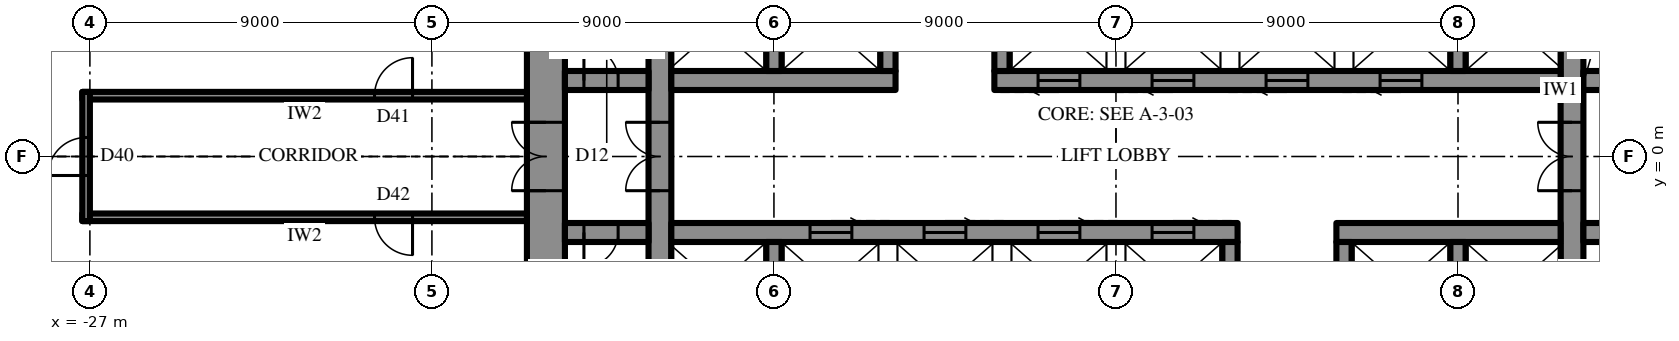
"""IFC4 building model, lengths in metres.
Left out: names, types, materials, properties, quantities, classifications, styles, units other than length and angle.
Written with IfcOpenShell. Run it as: python <this file> out.ifc"""

import sys

from ifc_helpers import new_model, si_unit, direction, frame, frame_2d, origin, place, context, subcontext, project, spatial, rectangle, extrude, element, fill, save


model = new_model("IFC4")
c1 = context("Model", 3, precision=1e-05, world=origin(), true_north=direction((0.0, 1.0)))
c2 = subcontext(c1, "Body", "Model", "MODEL_VIEW")
j1 = project(units=[si_unit("LENGTHUNIT", "METRE"), si_unit("PLANEANGLEUNIT", "RADIAN")], contexts=[c1])
p1 = place(None, origin())
s1 = spatial("IfcSite", under=j1, at=p1, CompositionType="ELEMENT")
p2 = place(p1, origin())
s2 = spatial("IfcBuilding", under=s1, at=p2, CompositionType="ELEMENT")
p3 = place(p2, frame((0.0, 0.0, 261.7)))
s3 = spatial("IfcBuildingStorey", under=s2, at=p3, CompositionType="ELEMENT", Elevation=261.7)
p4 = place(p3, frame((-15.0, 10.7, 0.0), z_axis=(0.0, 0.0, 1.0), x_axis=(0.0, -1.0, 0.0)))
e1 = element("IfcWall", 1, at=p4, inside=s3, PredefinedType="SHEAR", context=c2, shape_type="SweptSolid", body=[
    extrude(rectangle(XDim=21.4, YDim=1.0, at=frame_2d((10.7, 0.0))), origin(), (0.0, 0.0, 1.0), 4.2),
])
p5 = place(p4, frame((9.8, 0.0, 0.0)))
e2 = element("IfcOpeningElement", 2, at=p5, cuts=e1, PredefinedType="OPENING", context=c2, shape_type="SweptSolid", body=[
    extrude(rectangle(XDim=1.8, YDim=2.4, at=frame_2d((0.9, 1.2))), frame((0.0, 0.51, 0.0), z_axis=(0.0, -1.0, 0.0), x_axis=(1.0, 0.0, 0.0)), (0.0, 0.0, 1.0), 1.02),
])
p6 = place(p3, frame((12.0, -10.7, 0.0), z_axis=(0.0, 0.0, 1.0), x_axis=(0.0, 1.0, 0.0)))
e3 = element("IfcWall", 3, at=p6, inside=s3, PredefinedType="SHEAR", context=c2, shape_type="SweptSolid", body=[
    extrude(rectangle(XDim=21.4, YDim=0.6, at=frame_2d((10.7, 0.0))), origin(), (0.0, 0.0, 1.0), 4.2),
])
p7 = place(p6, frame((9.8, 0.0, 0.0)))
e4 = element("IfcOpeningElement", 4, at=p7, cuts=e3, PredefinedType="OPENING", context=c2, shape_type="SweptSolid", body=[
    extrude(rectangle(XDim=1.8, YDim=2.4, at=frame_2d((0.9, 1.2))), frame((0.0, 0.31, 0.0), z_axis=(0.0, -1.0, 0.0), x_axis=(1.0, 0.0, 0.0)), (0.0, 0.0, 1.0), 0.62),
])
p8 = place(p3, frame((-12.0, -10.7, 0.0), z_axis=(0.0, 0.0, 1.0), x_axis=(0.0, 1.0, 0.0)))
e5 = element("IfcWall", 5, at=p8, inside=s3, PredefinedType="SHEAR", context=c2, shape_type="SweptSolid", body=[
    extrude(rectangle(XDim=21.4, YDim=0.6, at=frame_2d((10.7, 0.0))), origin(), (0.0, 0.0, 1.0), 4.2),
])
p9 = place(p8, frame((9.8, 0.0, 0.0)))
e6 = element("IfcOpeningElement", 6, at=p9, cuts=e5, PredefinedType="OPENING", context=c2, shape_type="SweptSolid", body=[
    extrude(rectangle(XDim=1.8, YDim=2.4, at=frame_2d((0.9, 1.2))), frame((0.0, 0.31, 0.0), z_axis=(0.0, -1.0, 0.0), x_axis=(1.0, 0.0, 0.0)), (0.0, 0.0, 1.0), 0.62),
])
p10 = place(p3, frame((-14.5, 2.0, 0.0), z_axis=(0.0, 0.0, 1.0), x_axis=(1.0, 0.0, 0.0)))
e7 = element("IfcWall", 7, at=p10, inside=s3, PredefinedType="SHEAR", context=c2, shape_type="SweptSolid", body=[
    extrude(rectangle(XDim=2.2, YDim=0.5, at=frame_2d((1.1, 0.0))), origin(), (0.0, 0.0, 1.0), 4.2),
])
p11 = place(p10, frame((0.5, 0.0, 0.0)))
e8 = element("IfcOpeningElement", 8, at=p11, cuts=e7, PredefinedType="OPENING", context=c2, shape_type="SweptSolid", body=[
    extrude(rectangle(XDim=0.9, YDim=2.2, at=frame_2d((0.45, 1.1))), frame((0.0, 0.26, 0.0), z_axis=(0.0, -1.0, 0.0), x_axis=(1.0, 0.0, 0.0)), (0.0, 0.0, 1.0), 0.52),
])
p12 = place(p3, frame((-11.7, 2.0, 0.0), z_axis=(0.0, 0.0, 1.0), x_axis=(1.0, 0.0, 0.0)))
e9 = element("IfcWall", 9, at=p12, inside=s3, PredefinedType="SHEAR", context=c2, shape_type="SweptSolid", body=[
    extrude(rectangle(XDim=5.9, YDim=0.5, at=frame_2d((2.95, 0.0))), origin(), (0.0, 0.0, 1.0), 4.2),
])
p13 = place(p3, frame((-3.2, 2.0, 0.0), z_axis=(0.0, 0.0, 1.0), x_axis=(1.0, 0.0, 0.0)))
e10 = element("IfcWall", 10, at=p13, inside=s3, PredefinedType="SHEAR", context=c2, shape_type="SweptSolid", body=[
    extrude(rectangle(XDim=14.9, YDim=0.5, at=frame_2d((7.45, 0.0))), origin(), (0.0, 0.0, 1.0), 4.2),
])
p14 = place(p13, frame((1.15, 0.0, 0.0)))
e11 = element("IfcOpeningElement", 11, at=p14, cuts=e10, PredefinedType="OPENING", context=c2, shape_type="SweptSolid", body=[
    extrude(rectangle(XDim=1.1, YDim=2.2, at=frame_2d((0.55, 1.1))), frame((0.0, 0.26, 0.0), z_axis=(0.0, -1.0, 0.0), x_axis=(1.0, 0.0, 0.0)), (0.0, 0.0, 1.0), 0.52),
])
p15 = place(p13, frame((4.15, 0.0, 0.0)))
e12 = element("IfcOpeningElement", 12, at=p15, cuts=e10, PredefinedType="OPENING", context=c2, shape_type="SweptSolid", body=[
    extrude(rectangle(XDim=1.1, YDim=2.2, at=frame_2d((0.55, 1.1))), frame((0.0, 0.26, 0.0), z_axis=(0.0, -1.0, 0.0), x_axis=(1.0, 0.0, 0.0)), (0.0, 0.0, 1.0), 0.52),
])
p16 = place(p13, frame((7.15, 0.0, 0.0)))
e13 = element("IfcOpeningElement", 13, at=p16, cuts=e10, PredefinedType="OPENING", context=c2, shape_type="SweptSolid", body=[
    extrude(rectangle(XDim=1.1, YDim=2.2, at=frame_2d((0.55, 1.1))), frame((0.0, 0.26, 0.0), z_axis=(0.0, -1.0, 0.0), x_axis=(1.0, 0.0, 0.0)), (0.0, 0.0, 1.0), 0.52),
])
p17 = place(p13, frame((10.15, 0.0, 0.0)))
e14 = element("IfcOpeningElement", 14, at=p17, cuts=e10, PredefinedType="OPENING", context=c2, shape_type="SweptSolid", body=[
    extrude(rectangle(XDim=1.1, YDim=2.2, at=frame_2d((0.55, 1.1))), frame((0.0, 0.26, 0.0), z_axis=(0.0, -1.0, 0.0), x_axis=(1.0, 0.0, 0.0)), (0.0, 0.0, 1.0), 0.52),
])
p18 = place(p3, frame((12.3, 2.0, 0.0), z_axis=(0.0, 0.0, 1.0), x_axis=(1.0, 0.0, 0.0)))
e15 = element("IfcWall", 15, at=p18, inside=s3, PredefinedType="SHEAR", context=c2, shape_type="SweptSolid", body=[
    extrude(rectangle(XDim=2.2, YDim=0.5, at=frame_2d((1.1, 0.0))), origin(), (0.0, 0.0, 1.0), 4.2),
])
p19 = place(p18, frame((0.8, 0.0, 0.0)))
e16 = element("IfcOpeningElement", 16, at=p19, cuts=e15, PredefinedType="OPENING", context=c2, shape_type="SweptSolid", body=[
    extrude(rectangle(XDim=0.9, YDim=2.2, at=frame_2d((0.45, 1.1))), frame((0.0, 0.26, 0.0), z_axis=(0.0, -1.0, 0.0), x_axis=(1.0, 0.0, 0.0)), (0.0, 0.0, 1.0), 0.52),
])
for number, where, z_axis, x_axis in (
    (17, (-9.0, 2.25, 0.0), (0.0, 0.0, 1.0), (0.0, 1.0, 0.0)),
    (18, (-6.0, 2.25, 0.0), (0.0, 0.0, 1.0), (0.0, 1.0, 0.0)),
    (19, (-3.0, 2.25, 0.0), (0.0, 0.0, 1.0), (0.0, 1.0, 0.0)),
    (20, (9.0, 2.25, 0.0), (0.0, 0.0, 1.0), (0.0, 1.0, 0.0)),
):
    element("IfcWall", number, at=place(p3, frame(where, z_axis=z_axis, x_axis=x_axis)), inside=s3, PredefinedType="SHEAR", context=c2, shape_type="SweptSolid", body=[
        extrude(rectangle(XDim=2.3, YDim=0.4, at=frame_2d((1.15, 0.0))), origin(), (0.0, 0.0, 1.0), 4.2),
    ])
p20 = place(p3, frame((14.5, -2.0, 0.0), z_axis=(0.0, 0.0, 1.0), x_axis=(-1.0, 0.0, 0.0)))
e21 = element("IfcWall", 21, at=p20, inside=s3, PredefinedType="SHEAR", context=c2, shape_type="SweptSolid", body=[
    extrude(rectangle(XDim=2.2, YDim=0.5, at=frame_2d((1.1, 0.0))), origin(), (0.0, 0.0, 1.0), 4.2),
])
p21 = place(p20, frame((0.5, 0.0, 0.0)))
e22 = element("IfcOpeningElement", 22, at=p21, cuts=e21, PredefinedType="OPENING", context=c2, shape_type="SweptSolid", body=[
    extrude(rectangle(XDim=0.9, YDim=2.2, at=frame_2d((0.45, 1.1))), frame((0.0, 0.26, 0.0), z_axis=(0.0, -1.0, 0.0), x_axis=(1.0, 0.0, 0.0)), (0.0, 0.0, 1.0), 0.52),
])
p22 = place(p3, frame((11.7, -2.0, 0.0), z_axis=(0.0, 0.0, 1.0), x_axis=(-1.0, 0.0, 0.0)))
e23 = element("IfcWall", 23, at=p22, inside=s3, PredefinedType="SHEAR", context=c2, shape_type="SweptSolid", body=[
    extrude(rectangle(XDim=5.9, YDim=0.5, at=frame_2d((2.95, 0.0))), origin(), (0.0, 0.0, 1.0), 4.2),
])
p23 = place(p3, frame((3.2, -2.0, 0.0), z_axis=(0.0, 0.0, 1.0), x_axis=(-1.0, 0.0, 0.0)))
e24 = element("IfcWall", 24, at=p23, inside=s3, PredefinedType="SHEAR", context=c2, shape_type="SweptSolid", body=[
    extrude(rectangle(XDim=14.9, YDim=0.5, at=frame_2d((7.45, 0.0))), origin(), (0.0, 0.0, 1.0), 4.2),
])
p24 = place(p23, frame((1.15, 0.0, 0.0)))
e25 = element("IfcOpeningElement", 25, at=p24, cuts=e24, PredefinedType="OPENING", context=c2, shape_type="SweptSolid", body=[
    extrude(rectangle(XDim=1.1, YDim=2.2, at=frame_2d((0.55, 1.1))), frame((0.0, 0.26, 0.0), z_axis=(0.0, -1.0, 0.0), x_axis=(1.0, 0.0, 0.0)), (0.0, 0.0, 1.0), 0.52),
])
p25 = place(p23, frame((4.15, 0.0, 0.0)))
e26 = element("IfcOpeningElement", 26, at=p25, cuts=e24, PredefinedType="OPENING", context=c2, shape_type="SweptSolid", body=[
    extrude(rectangle(XDim=1.1, YDim=2.2, at=frame_2d((0.55, 1.1))), frame((0.0, 0.26, 0.0), z_axis=(0.0, -1.0, 0.0), x_axis=(1.0, 0.0, 0.0)), (0.0, 0.0, 1.0), 0.52),
])
p26 = place(p23, frame((7.15, 0.0, 0.0)))
e27 = element("IfcOpeningElement", 27, at=p26, cuts=e24, PredefinedType="OPENING", context=c2, shape_type="SweptSolid", body=[
    extrude(rectangle(XDim=1.1, YDim=2.2, at=frame_2d((0.55, 1.1))), frame((0.0, 0.26, 0.0), z_axis=(0.0, -1.0, 0.0), x_axis=(1.0, 0.0, 0.0)), (0.0, 0.0, 1.0), 0.52),
])
p27 = place(p23, frame((10.15, 0.0, 0.0)))
e28 = element("IfcOpeningElement", 28, at=p27, cuts=e24, PredefinedType="OPENING", context=c2, shape_type="SweptSolid", body=[
    extrude(rectangle(XDim=1.1, YDim=2.2, at=frame_2d((0.55, 1.1))), frame((0.0, 0.26, 0.0), z_axis=(0.0, -1.0, 0.0), x_axis=(1.0, 0.0, 0.0)), (0.0, 0.0, 1.0), 0.52),
])
p28 = place(p3, frame((-12.3, -2.0, 0.0), z_axis=(0.0, 0.0, 1.0), x_axis=(-1.0, 0.0, 0.0)))
e29 = element("IfcWall", 29, at=p28, inside=s3, PredefinedType="SHEAR", context=c2, shape_type="SweptSolid", body=[
    extrude(rectangle(XDim=2.2, YDim=0.5, at=frame_2d((1.1, 0.0))), origin(), (0.0, 0.0, 1.0), 4.2),
])
p29 = place(p28, frame((0.8, 0.0, 0.0)))
e30 = element("IfcOpeningElement", 30, at=p29, cuts=e29, PredefinedType="OPENING", context=c2, shape_type="SweptSolid", body=[
    extrude(rectangle(XDim=0.9, YDim=2.2, at=frame_2d((0.45, 1.1))), frame((0.0, 0.26, 0.0), z_axis=(0.0, -1.0, 0.0), x_axis=(1.0, 0.0, 0.0)), (0.0, 0.0, 1.0), 0.52),
])
for number, where, z_axis, x_axis in (
    (31, (9.0, -2.25, 0.0), (0.0, 0.0, 1.0), (0.0, -1.0, 0.0)),
    (32, (6.0, -2.25, 0.0), (0.0, 0.0, 1.0), (0.0, -1.0, 0.0)),
    (33, (3.0, -2.25, 0.0), (0.0, 0.0, 1.0), (0.0, -1.0, 0.0)),
    (34, (-9.0, -2.25, 0.0), (0.0, 0.0, 1.0), (0.0, -1.0, 0.0)),
):
    element("IfcWall", number, at=place(p3, frame(where, z_axis=z_axis, x_axis=x_axis)), inside=s3, PredefinedType="SHEAR", context=c2, shape_type="SweptSolid", body=[
        extrude(rectangle(XDim=2.3, YDim=0.4, at=frame_2d((1.15, 0.0))), origin(), (0.0, 0.0, 1.0), 4.2),
    ])
p30 = place(p3, frame((-15.5, 1.6, 0.0), z_axis=(0.0, 0.0, 1.0), x_axis=(-1.0, 0.0, 0.0)))
e35 = element("IfcWall", 35, at=p30, inside=s3, PredefinedType="PARTITIONING", context=c2, shape_type="SweptSolid", body=[
    extrude(rectangle(XDim=11.7, YDim=0.2, at=frame_2d((5.85, 0.0))), origin(), (0.0, 0.0, 1.0), 4.0),
])
p31 = place(p30, frame((3.01, 0.0, 0.0)))
e36 = element("IfcOpeningElement", 36, at=p31, cuts=e35, PredefinedType="OPENING", context=c2, shape_type="SweptSolid", body=[
    extrude(rectangle(XDim=1.0, YDim=2.2, at=frame_2d((0.5, 1.1))), frame((0.0, 0.11, 0.0), z_axis=(0.0, -1.0, 0.0), x_axis=(1.0, 0.0, 0.0)), (0.0, 0.0, 1.0), 0.22),
])
p32 = place(p3, frame((-15.5, -1.6, 0.0), z_axis=(0.0, 0.0, 1.0), x_axis=(-1.0, 0.0, 0.0)))
e37 = element("IfcWall", 37, at=p32, inside=s3, PredefinedType="PARTITIONING", context=c2, shape_type="SweptSolid", body=[
    extrude(rectangle(XDim=11.7, YDim=0.2, at=frame_2d((5.85, 0.0))), origin(), (0.0, 0.0, 1.0), 4.0),
])
p33 = place(p32, frame((3.01, 0.0, 0.0)))
e38 = element("IfcOpeningElement", 38, at=p33, cuts=e37, PredefinedType="OPENING", context=c2, shape_type="SweptSolid", body=[
    extrude(rectangle(XDim=1.0, YDim=2.2, at=frame_2d((0.5, 1.1))), frame((0.0, 0.11, 0.0), z_axis=(0.0, -1.0, 0.0), x_axis=(1.0, 0.0, 0.0)), (0.0, 0.0, 1.0), 0.22),
])
p34 = place(p3, frame((-27.1, -1.7, 0.0), z_axis=(0.0, 0.0, 1.0), x_axis=(0.0, 1.0, 0.0)))
e39 = element("IfcWall", 39, at=p34, inside=s3, PredefinedType="PARTITIONING", context=c2, shape_type="SweptSolid", body=[
    extrude(rectangle(XDim=3.4, YDim=0.2, at=frame_2d((1.7, 0.0))), origin(), (0.0, 0.0, 1.0), 4.0),
])
p35 = place(p34, frame((1.2, 0.0, 0.0)))
e40 = element("IfcOpeningElement", 40, at=p35, cuts=e39, PredefinedType="OPENING", context=c2, shape_type="SweptSolid", body=[
    extrude(rectangle(XDim=1.0, YDim=2.2, at=frame_2d((0.5, 1.1))), frame((0.0, 0.11, 0.0), z_axis=(0.0, -1.0, 0.0), x_axis=(1.0, 0.0, 0.0)), (0.0, 0.0, 1.0), 0.22),
])
p36 = place(p5, frame((1.8, 0.0, 0.0), z_axis=(0.0, 0.0, 1.0), x_axis=(-1.0, 0.0, 0.0)))
e41 = element("IfcDoor", 41, at=p36, inside=s3, OperationType="DOUBLE_DOOR_SINGLE_SWING", PredefinedType="DOOR", context=c2, shape_type="SweptSolid", body=[
    extrude(rectangle(XDim=1.8, YDim=2.4, at=frame_2d((0.9, 1.2))), frame((0.0, 0.025, 0.0), z_axis=(0.0, -1.0, 0.0), x_axis=(1.0, 0.0, 0.0)), (0.0, 0.0, 1.0), 0.05),
])
fill(e2, e41)
p37 = place(p11, origin())
e42 = element("IfcDoor", 42, at=p37, inside=s3, OperationType="SINGLE_SWING_RIGHT", PredefinedType="DOOR", context=c2, shape_type="SweptSolid", body=[
    extrude(rectangle(XDim=0.9, YDim=2.2, at=frame_2d((0.45, 1.1))), frame((0.0, 0.025, 0.0), z_axis=(0.0, -1.0, 0.0), x_axis=(1.0, 0.0, 0.0)), (0.0, 0.0, 1.0), 0.05),
])
fill(e8, e42)
p38 = place(p29, origin())
e43 = element("IfcDoor", 43, at=p38, inside=s3, OperationType="SINGLE_SWING_LEFT", PredefinedType="DOOR", context=c2, shape_type="SweptSolid", body=[
    extrude(rectangle(XDim=0.9, YDim=2.2, at=frame_2d((0.45, 1.1))), frame((0.0, 0.025, 0.0), z_axis=(0.0, -1.0, 0.0), x_axis=(1.0, 0.0, 0.0)), (0.0, 0.0, 1.0), 0.05),
])
fill(e30, e43)
p39 = place(p7, origin())
e44 = element("IfcDoor", 44, at=p39, inside=s3, OperationType="DOUBLE_DOOR_SINGLE_SWING", PredefinedType="DOOR", context=c2, shape_type="SweptSolid", body=[
    extrude(rectangle(XDim=1.8, YDim=2.4, at=frame_2d((0.9, 1.2))), frame((0.0, 0.025, 0.0), z_axis=(0.0, -1.0, 0.0), x_axis=(1.0, 0.0, 0.0)), (0.0, 0.0, 1.0), 0.05),
])
fill(e4, e44)
p40 = place(p9, origin())
e45 = element("IfcDoor", 45, at=p40, inside=s3, OperationType="DOUBLE_DOOR_SINGLE_SWING", PredefinedType="DOOR", context=c2, shape_type="SweptSolid", body=[
    extrude(rectangle(XDim=1.8, YDim=2.4, at=frame_2d((0.9, 1.2))), frame((0.0, 0.025, 0.0), z_axis=(0.0, -1.0, 0.0), x_axis=(1.0, 0.0, 0.0)), (0.0, 0.0, 1.0), 0.05),
])
fill(e6, e45)
p41 = place(p14, frame((1.1, 0.0, 0.0), z_axis=(0.0, 0.0, 1.0), x_axis=(-1.0, 0.0, 0.0)))
e46 = element("IfcDoor", 46, at=p41, inside=s3, OperationType="SLIDING_TO_LEFT", PredefinedType="DOOR", context=c2, shape_type="SweptSolid", body=[
    extrude(rectangle(XDim=1.1, YDim=2.2, at=frame_2d((0.55, 1.1))), frame((0.0, 0.025, 0.0), z_axis=(0.0, -1.0, 0.0), x_axis=(1.0, 0.0, 0.0)), (0.0, 0.0, 1.0), 0.05),
])
fill(e11, e46)
p42 = place(p15, frame((1.1, 0.0, 0.0), z_axis=(0.0, 0.0, 1.0), x_axis=(-1.0, 0.0, 0.0)))
e47 = element("IfcDoor", 47, at=p42, inside=s3, OperationType="SLIDING_TO_LEFT", PredefinedType="DOOR", context=c2, shape_type="SweptSolid", body=[
    extrude(rectangle(XDim=1.1, YDim=2.2, at=frame_2d((0.55, 1.1))), frame((0.0, 0.025, 0.0), z_axis=(0.0, -1.0, 0.0), x_axis=(1.0, 0.0, 0.0)), (0.0, 0.0, 1.0), 0.05),
])
fill(e12, e47)
p43 = place(p16, frame((1.1, 0.0, 0.0), z_axis=(0.0, 0.0, 1.0), x_axis=(-1.0, 0.0, 0.0)))
e48 = element("IfcDoor", 48, at=p43, inside=s3, OperationType="SLIDING_TO_LEFT", PredefinedType="DOOR", context=c2, shape_type="SweptSolid", body=[
    extrude(rectangle(XDim=1.1, YDim=2.2, at=frame_2d((0.55, 1.1))), frame((0.0, 0.025, 0.0), z_axis=(0.0, -1.0, 0.0), x_axis=(1.0, 0.0, 0.0)), (0.0, 0.0, 1.0), 0.05),
])
fill(e13, e48)
p44 = place(p17, frame((1.1, 0.0, 0.0), z_axis=(0.0, 0.0, 1.0), x_axis=(-1.0, 0.0, 0.0)))
e49 = element("IfcDoor", 49, at=p44, inside=s3, OperationType="SLIDING_TO_LEFT", PredefinedType="DOOR", context=c2, shape_type="SweptSolid", body=[
    extrude(rectangle(XDim=1.1, YDim=2.2, at=frame_2d((0.55, 1.1))), frame((0.0, 0.025, 0.0), z_axis=(0.0, -1.0, 0.0), x_axis=(1.0, 0.0, 0.0)), (0.0, 0.0, 1.0), 0.05),
])
fill(e14, e49)
p45 = place(p24, frame((1.1, 0.0, 0.0), z_axis=(0.0, 0.0, 1.0), x_axis=(-1.0, 0.0, 0.0)))
e50 = element("IfcDoor", 50, at=p45, inside=s3, OperationType="SLIDING_TO_LEFT", PredefinedType="DOOR", context=c2, shape_type="SweptSolid", body=[
    extrude(rectangle(XDim=1.1, YDim=2.2, at=frame_2d((0.55, 1.1))), frame((0.0, 0.025, 0.0), z_axis=(0.0, -1.0, 0.0), x_axis=(1.0, 0.0, 0.0)), (0.0, 0.0, 1.0), 0.05),
])
fill(e25, e50)
p46 = place(p25, frame((1.1, 0.0, 0.0), z_axis=(0.0, 0.0, 1.0), x_axis=(-1.0, 0.0, 0.0)))
e51 = element("IfcDoor", 51, at=p46, inside=s3, OperationType="SLIDING_TO_LEFT", PredefinedType="DOOR", context=c2, shape_type="SweptSolid", body=[
    extrude(rectangle(XDim=1.1, YDim=2.2, at=frame_2d((0.55, 1.1))), frame((0.0, 0.025, 0.0), z_axis=(0.0, -1.0, 0.0), x_axis=(1.0, 0.0, 0.0)), (0.0, 0.0, 1.0), 0.05),
])
fill(e26, e51)
p47 = place(p26, frame((1.1, 0.0, 0.0), z_axis=(0.0, 0.0, 1.0), x_axis=(-1.0, 0.0, 0.0)))
e52 = element("IfcDoor", 52, at=p47, inside=s3, OperationType="SLIDING_TO_LEFT", PredefinedType="DOOR", context=c2, shape_type="SweptSolid", body=[
    extrude(rectangle(XDim=1.1, YDim=2.2, at=frame_2d((0.55, 1.1))), frame((0.0, 0.025, 0.0), z_axis=(0.0, -1.0, 0.0), x_axis=(1.0, 0.0, 0.0)), (0.0, 0.0, 1.0), 0.05),
])
fill(e27, e52)
p48 = place(p27, frame((1.1, 0.0, 0.0), z_axis=(0.0, 0.0, 1.0), x_axis=(-1.0, 0.0, 0.0)))
e53 = element("IfcDoor", 53, at=p48, inside=s3, OperationType="SLIDING_TO_LEFT", PredefinedType="DOOR", context=c2, shape_type="SweptSolid", body=[
    extrude(rectangle(XDim=1.1, YDim=2.2, at=frame_2d((0.55, 1.1))), frame((0.0, 0.025, 0.0), z_axis=(0.0, -1.0, 0.0), x_axis=(1.0, 0.0, 0.0)), (0.0, 0.0, 1.0), 0.05),
])
fill(e28, e53)
p49 = place(p31, frame((1.0, 0.0, 0.0), z_axis=(0.0, 0.0, 1.0), x_axis=(-1.0, 0.0, 0.0)))
e54 = element("IfcDoor", 54, at=p49, inside=s3, OperationType="SINGLE_SWING_LEFT", PredefinedType="DOOR", context=c2, shape_type="SweptSolid", body=[
    extrude(rectangle(XDim=1.0, YDim=2.2, at=frame_2d((0.5, 1.1))), frame((0.0, 0.025, 0.0), z_axis=(0.0, -1.0, 0.0), x_axis=(1.0, 0.0, 0.0)), (0.0, 0.0, 1.0), 0.05),
])
fill(e36, e54)
p50 = place(p33, origin())
e55 = element("IfcDoor", 55, at=p50, inside=s3, OperationType="SINGLE_SWING_RIGHT", PredefinedType="DOOR", context=c2, shape_type="SweptSolid", body=[
    extrude(rectangle(XDim=1.0, YDim=2.2, at=frame_2d((0.5, 1.1))), frame((0.0, 0.025, 0.0), z_axis=(0.0, -1.0, 0.0), x_axis=(1.0, 0.0, 0.0)), (0.0, 0.0, 1.0), 0.05),
])
fill(e38, e55)
p51 = place(p35, origin())
e56 = element("IfcDoor", 56, at=p51, inside=s3, OperationType="SINGLE_SWING_RIGHT", PredefinedType="DOOR", context=c2, shape_type="SweptSolid", body=[
    extrude(rectangle(XDim=1.0, YDim=2.2, at=frame_2d((0.5, 1.1))), frame((0.0, 0.025, 0.0), z_axis=(0.0, -1.0, 0.0), x_axis=(1.0, 0.0, 0.0)), (0.0, 0.0, 1.0), 0.05),
])
fill(e40, e56)
save(model, sys.argv[1])
